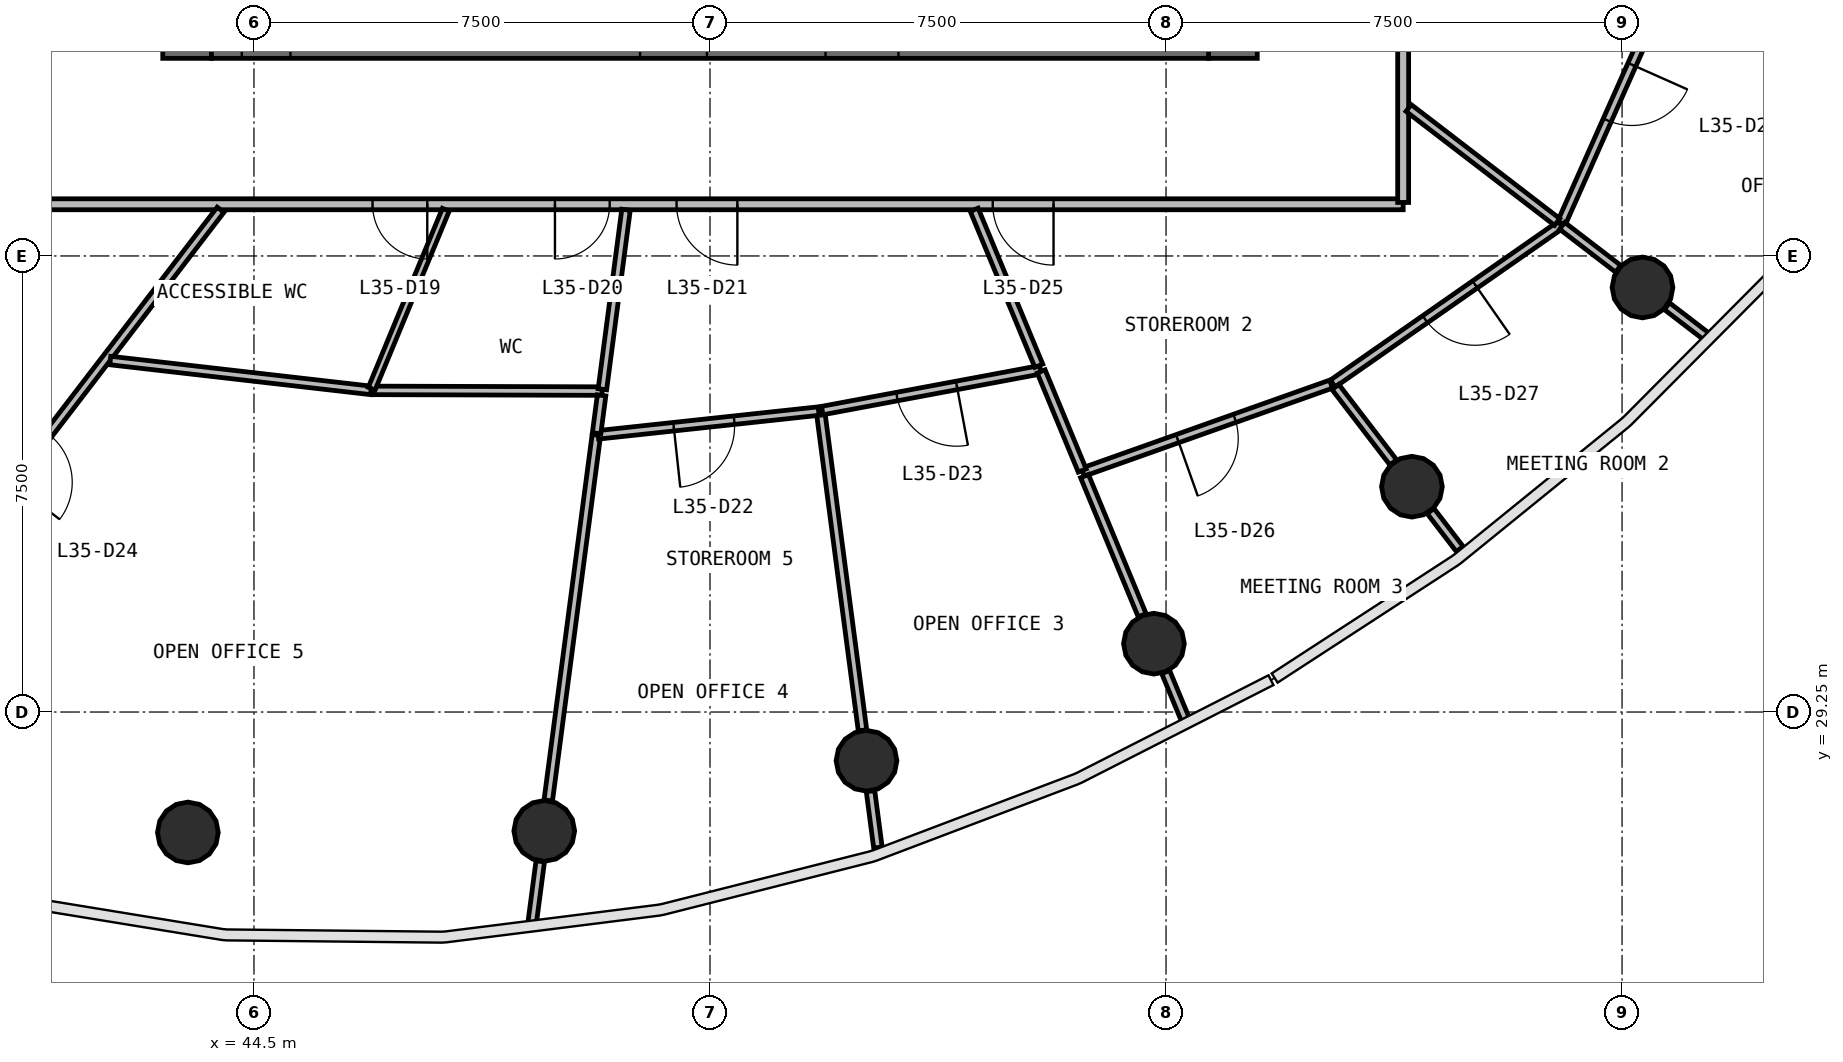
"""IFC4 building model, lengths in metres.
Left out: names, types, materials, properties, quantities, classifications, styles, units other than length and angle.
Written with IfcOpenShell. Run it as: python <this file> out.ifc"""

import sys

from ifc_helpers import new_model, si_unit, direction, frame, frame_2d, origin, origin_2d, place, context, subcontext, project, spatial, rectangle, circle, extrude, source, transform, mapped, element, fill, save


model = new_model("IFC4")
c1 = context("Model", 3, precision=1e-05, world=origin(), true_north=direction((0.0, 1.0)))
c2 = subcontext(c1, "Body", "Model", "MODEL_VIEW")
j1 = project(units=[si_unit("LENGTHUNIT", "METRE"), si_unit("PLANEANGLEUNIT", "RADIAN")], contexts=[c1])
p1 = place(None, origin())
s1 = spatial("IfcSite", under=j1, at=p1, CompositionType="ELEMENT")
p2 = place(p1, origin())
s2 = spatial("IfcBuilding", under=s1, at=p2, CompositionType="ELEMENT")
p3 = place(p2, frame((0.0, 0.0, 148.7)))
s3 = spatial("IfcBuildingStorey", under=s2, at=p3, CompositionType="ELEMENT", Elevation=148.7)
p4 = place(p3, frame((60.6, 40.0, 0.0), z_axis=(0.0, 0.0, 1.0), x_axis=(0.0, 1.0, 0.0)))
e1 = element("IfcWall", 1, at=p4, inside=s3, PredefinedType="SHEAR", context=c2, shape_type="SweptSolid", body=[
    extrude(rectangle(XDim=16.0, YDim=0.8, at=frame_2d((8.0, 0.0))), origin(), (0.0, 0.0, 1.0), 3.9),
])
p5 = place(p4, frame((7.1, 0.0, 0.0)))
e2 = element("IfcOpeningElement", 2, at=p5, cuts=e1, PredefinedType="OPENING", context=c2, shape_type="SweptSolid", body=[
    extrude(rectangle(XDim=1.8, YDim=2.1, at=frame_2d((0.9, 1.05))), frame((0.0, 0.41, 0.0), z_axis=(0.0, -1.0, 0.0), x_axis=(1.0, 0.0, 0.0)), (0.0, 0.0, 1.0), 0.82),
])
p6 = place(p3, frame((43.4, 56.0, 0.0), z_axis=(0.0, 0.0, 1.0), x_axis=(0.0, -1.0, 0.0)))
e3 = element("IfcWall", 3, at=p6, inside=s3, PredefinedType="SHEAR", context=c2, shape_type="SweptSolid", body=[
    extrude(rectangle(XDim=16.0, YDim=0.8, at=frame_2d((8.0, 0.0))), origin(), (0.0, 0.0, 1.0), 3.9),
])
p7 = place(p6, frame((7.1, 0.0, 0.0)))
e4 = element("IfcOpeningElement", 4, at=p7, cuts=e3, PredefinedType="OPENING", context=c2, shape_type="SweptSolid", body=[
    extrude(rectangle(XDim=1.8, YDim=2.1, at=frame_2d((0.9, 1.05))), frame((0.0, 0.41, 0.0), z_axis=(0.0, -1.0, 0.0), x_axis=(1.0, 0.0, 0.0)), (0.0, 0.0, 1.0), 0.82),
])
p8 = place(p3, frame((43.8, 40.4, 0.0), z_axis=(0.0, 0.0, 1.0), x_axis=(1.0, 0.0, 0.0)))
e5 = element("IfcWall", 5, at=p8, inside=s3, PredefinedType="SHEAR", context=c2, shape_type="SweptSolid", body=[
    extrude(rectangle(XDim=16.4, YDim=0.8, at=frame_2d((8.2, 0.0))), origin(), (0.0, 0.0, 1.0), 3.9),
])
p9 = place(p8, frame((10.1, 0.0, 0.0)))
e6 = element("IfcOpeningElement", 6, at=p9, cuts=e5, PredefinedType="OPENING", context=c2, shape_type="SweptSolid", body=[
    extrude(rectangle(XDim=1.2, YDim=2.1, at=frame_2d((0.6, 1.05))), frame((0.0, 0.41, 0.0), z_axis=(0.0, -1.0, 0.0), x_axis=(1.0, 0.0, 0.0)), (0.0, 0.0, 1.0), 0.82),
])
p10 = place(p8, frame((7.05, 0.0, 0.0)))
e7 = element("IfcOpeningElement", 7, at=p10, cuts=e5, PredefinedType="OPENING", context=c2, shape_type="SweptSolid", body=[
    extrude(rectangle(XDim=1.1, YDim=2.1, at=frame_2d((0.55, 1.05))), frame((0.0, 0.41, 0.0), z_axis=(0.0, -1.0, 0.0), x_axis=(1.0, 0.0, 0.0)), (0.0, 0.0, 1.0), 0.82),
])
p11 = place(p8, frame((0.5, 0.0, 0.0)))
e8 = element("IfcOpeningElement", 8, at=p11, cuts=e5, PredefinedType="OPENING", context=c2, shape_type="SweptSolid", body=[
    extrude(rectangle(XDim=0.8, YDim=2.1, at=frame_2d((0.4, 1.05))), frame((0.0, 0.41, 0.0), z_axis=(0.0, -1.0, 0.0), x_axis=(1.0, 0.0, 0.0)), (0.0, 0.0, 1.0), 0.82),
])
m1 = source(origin(), c2, "Body", "SweptSolid", [
    extrude(circle(Radius=0.5, at=origin_2d()), origin(), (0.0, 0.0, 1.0), 3.9),
])
for number, where, z_axis, x_axis in (
    (9, (43.413, 27.269, 0.0), (0.0, 0.0, 1.0), (1.0, 0.0, 0.0)),
    (10, (49.274, 27.295, 0.0), (0.0, 0.0, 1.0), (1.0, 0.0, 0.0)),
    (11, (54.574, 28.449, 0.0), (0.0, 0.0, 1.0), (1.0, 0.0, 0.0)),
    (12, (59.301, 30.374, 0.0), (0.0, 0.0, 1.0), (1.0, 0.0, 0.0)),
    (13, (63.544, 32.956, 0.0), (0.0, 0.0, 1.0), (1.0, 0.0, 0.0)),
    (14, (67.336, 36.232, 0.0), (0.0, 0.0, 1.0), (1.0, 0.0, 0.0)),
):
    element("IfcColumn", number, at=place(p3, frame(where, z_axis=z_axis, x_axis=x_axis)), inside=s3, PredefinedType="COLUMN", context=c2, shape_type="MappedRepresentation", body=[
        mapped(m1, transform((0.0, 0.0, 0.0), scale=1.0)),
    ])
p12 = place(p3, frame((63.4, 37.6, 0.0), z_axis=(0.0, 0.0, 1.0), x_axis=(-1.0, 0.0, 0.0)))
e15 = element("IfcWall", 15, at=p12, inside=s3, PredefinedType="PARTITIONING", context=c2, shape_type="SweptSolid", body=[
    extrude(rectangle(XDim=22.8, YDim=0.18, at=frame_2d((11.4, 0.0))), origin(), (0.0, 0.0, 1.0), 2.88),
])
p13 = place(p12, frame((16.05, 0.0, 0.0)))
e16 = element("IfcOpeningElement", 16, at=p13, cuts=e15, PredefinedType="OPENING", context=c2, shape_type="SweptSolid", body=[
    extrude(rectangle(XDim=0.9, YDim=2.1, at=frame_2d((0.45, 1.05))), frame((0.0, 0.1, 0.0), z_axis=(0.0, -1.0, 0.0), x_axis=(1.0, 0.0, 0.0)), (0.0, 0.0, 1.0), 0.2),
])
p14 = place(p12, frame((13.05, 0.0, 0.0)))
e17 = element("IfcOpeningElement", 17, at=p14, cuts=e15, PredefinedType="OPENING", context=c2, shape_type="SweptSolid", body=[
    extrude(rectangle(XDim=0.9, YDim=2.1, at=frame_2d((0.45, 1.05))), frame((0.0, 0.1, 0.0), z_axis=(0.0, -1.0, 0.0), x_axis=(1.0, 0.0, 0.0)), (0.0, 0.0, 1.0), 0.2),
])
p15 = place(p12, frame((10.95, 0.0, 0.0)))
e18 = element("IfcOpeningElement", 18, at=p15, cuts=e15, PredefinedType="OPENING", context=c2, shape_type="SweptSolid", body=[
    extrude(rectangle(XDim=1.0, YDim=2.1, at=frame_2d((0.5, 1.05))), frame((0.0, 0.1, 0.0), z_axis=(0.0, -1.0, 0.0), x_axis=(1.0, 0.0, 0.0)), (0.0, 0.0, 1.0), 0.2),
])
p16 = place(p12, frame((5.75, 0.0, 0.0)))
e19 = element("IfcOpeningElement", 19, at=p16, cuts=e15, PredefinedType="OPENING", context=c2, shape_type="SweptSolid", body=[
    extrude(rectangle(XDim=1.0, YDim=2.1, at=frame_2d((0.5, 1.05))), frame((0.0, 0.1, 0.0), z_axis=(0.0, -1.0, 0.0), x_axis=(1.0, 0.0, 0.0)), (0.0, 0.0, 1.0), 0.2),
])
p17 = place(p3, frame((63.4, 58.37, 0.0), z_axis=(0.0, 0.0, 1.0), x_axis=(0.0, -1.0, 0.0)))
e20 = element("IfcWall", 20, at=p17, inside=s3, PredefinedType="PARTITIONING", context=c2, shape_type="SweptSolid", body=[
    extrude(rectangle(XDim=20.74, YDim=0.18, at=frame_2d((10.37, 0.0))), origin(), (0.0, 0.0, 1.0), 2.88),
])
p18 = place(p17, frame((9.89, 0.0, 0.0)))
e21 = element("IfcOpeningElement", 21, at=p18, cuts=e20, PredefinedType="OPENING", context=c2, shape_type="SweptSolid", body=[
    extrude(rectangle(XDim=1.0, YDim=2.1, at=frame_2d((0.5, 1.05))), frame((0.0, 0.1, 0.0), z_axis=(0.0, -1.0, 0.0), x_axis=(1.0, 0.0, 0.0)), (0.0, 0.0, 1.0), 0.2),
])
p19 = place(p17, frame((7.69, 0.0, 0.0)))
e22 = element("IfcOpeningElement", 22, at=p19, cuts=e20, PredefinedType="OPENING", context=c2, shape_type="SweptSolid", body=[
    extrude(rectangle(XDim=1.0, YDim=2.1, at=frame_2d((0.5, 1.05))), frame((0.0, 0.1, 0.0), z_axis=(0.0, -1.0, 0.0), x_axis=(1.0, 0.0, 0.0)), (0.0, 0.0, 1.0), 0.2),
])
p20 = place(p17, frame((4.29, 0.0, 0.0)))
e23 = element("IfcOpeningElement", 23, at=p20, cuts=e20, PredefinedType="OPENING", context=c2, shape_type="SweptSolid", body=[
    extrude(rectangle(XDim=1.0, YDim=2.1, at=frame_2d((0.5, 1.05))), frame((0.0, 0.1, 0.0), z_axis=(0.0, -1.0, 0.0), x_axis=(1.0, 0.0, 0.0)), (0.0, 0.0, 1.0), 0.2),
])
p21 = place(p3, frame((43.951, 37.51, 0.0), z_axis=(0.0, 0.0, 1.0), x_axis=(-0.608768467527, -0.793347939396, 0.0)))
e24 = element("IfcWall", 24, at=p21, inside=s3, PredefinedType="PARTITIONING", context=c2, shape_type="SweptSolid", body=[
    extrude(rectangle(XDim=10.297, YDim=0.14, at=frame_2d((5.148, 0.0))), origin(), (0.0, 0.0, 1.0), 2.88),
])
p22 = place(p21, frame((4.65, 0.0, 0.0)))
e25 = element("IfcOpeningElement", 25, at=p22, cuts=e24, PredefinedType="OPENING", context=c2, shape_type="SweptSolid", body=[
    extrude(rectangle(XDim=1.0, YDim=2.1, at=frame_2d((0.5, 1.05))), frame((0.0, 0.08, 0.0), z_axis=(0.0, -1.0, 0.0), x_axis=(1.0, 0.0, 0.0)), (0.0, 0.0, 1.0), 0.16),
])
p23 = place(p3, frame((50.131, 33.805, 0.0), z_axis=(0.0, 0.0, 1.0), x_axis=(-0.130525353545, -0.991444971787, 0.0)))
e26 = element("IfcWall", 26, at=p23, inside=s3, PredefinedType="PARTITIONING", context=c2, shape_type="SweptSolid", body=[
    extrude(rectangle(XDim=6.062, YDim=0.14, at=frame_2d((3.031, 0.0))), origin(), (0.0, 0.0, 1.0), 2.88),
])
p24 = place(p3, frame((53.816, 34.202, 0.0), z_axis=(0.0, 0.0, 1.0), x_axis=(0.130530791744, -0.991444255824, 0.0)))
e27 = element("IfcWall", 27, at=p24, inside=s3, PredefinedType="PARTITIONING", context=c2, shape_type="SweptSolid", body=[
    extrude(rectangle(XDim=5.299, YDim=0.14, at=frame_2d((2.649, 0.0))), origin(), (0.0, 0.0, 1.0), 2.88),
])
p25 = place(p3, frame((65.991, 37.264, 0.0), z_axis=(0.0, 0.0, 1.0), x_axis=(-0.820422470547, -0.571757789471, 0.0)))
e28 = element("IfcWall", 28, at=p25, inside=s3, PredefinedType="PARTITIONING", context=c2, shape_type="SweptSolid", body=[
    extrude(rectangle(XDim=4.569, YDim=0.14, at=frame_2d((2.285, 0.0))), origin(), (0.0, 0.0, 1.0), 2.88),
])
p26 = place(p25, frame((1.719, 0.0, 0.0)))
e29 = element("IfcOpeningElement", 29, at=p26, cuts=e28, PredefinedType="OPENING", context=c2, shape_type="SweptSolid", body=[
    extrude(rectangle(XDim=1.0, YDim=2.1, at=frame_2d((0.5, 1.05))), frame((0.0, 0.08, 0.0), z_axis=(0.0, -1.0, 0.0), x_axis=(1.0, 0.0, 0.0)), (0.0, 0.0, 1.0), 0.16),
])
p27 = place(p3, frame((67.847, 41.436, 0.0), z_axis=(0.0, 0.0, 1.0), x_axis=(-0.406478027922, -0.913660556671, 0.0)))
e30 = element("IfcWall", 30, at=p27, inside=s3, PredefinedType="PARTITIONING", context=c2, shape_type="SweptSolid", body=[
    extrude(rectangle(XDim=4.536, YDim=0.14, at=frame_2d((2.268, 0.0))), origin(), (0.0, 0.0, 1.0), 2.88),
])
p28 = place(p27, frame((1.686, 0.0, 0.0)))
e31 = element("IfcOpeningElement", 31, at=p28, cuts=e30, PredefinedType="OPENING", context=c2, shape_type="SweptSolid", body=[
    extrude(rectangle(XDim=1.0, YDim=2.1, at=frame_2d((0.5, 1.05))), frame((0.0, 0.08, 0.0), z_axis=(0.0, -1.0, 0.0), x_axis=(1.0, 0.0, 0.0)), (0.0, 0.0, 1.0), 0.16),
])
p29 = place(p3, frame((42.136, 35.031, 0.0), z_axis=(0.0, 0.0, 1.0), x_axis=(0.993502737761, -0.113808216145, 0.0)))
e32 = element("IfcWall", 32, at=p29, inside=s3, PredefinedType="PARTITIONING", context=c2, shape_type="SweptSolid", body=[
    extrude(rectangle(XDim=4.316, YDim=0.14, at=frame_2d((2.158, 0.0))), origin(), (0.0, 0.0, 1.0), 2.88),
])
p30 = place(p3, frame((62.214, 34.642, 0.0), z_axis=(0.0, 0.0, 1.0), x_axis=(-0.942495933597, -0.33421761646, 0.0)))
e33 = element("IfcWall", 33, at=p30, inside=s3, PredefinedType="PARTITIONING", context=c2, shape_type="SweptSolid", body=[
    extrude(rectangle(XDim=4.33, YDim=0.14, at=frame_2d((2.165, 0.0))), origin(), (0.0, 0.0, 1.0), 2.88),
])
p31 = place(p30, frame((1.681, 0.0, 0.0)))
e34 = element("IfcOpeningElement", 34, at=p31, cuts=e33, PredefinedType="OPENING", context=c2, shape_type="SweptSolid", body=[
    extrude(rectangle(XDim=1.0, YDim=2.1, at=frame_2d((0.5, 1.05))), frame((0.0, 0.08, 0.0), z_axis=(0.0, -1.0, 0.0), x_axis=(1.0, 0.0, 0.0)), (0.0, 0.0, 1.0), 0.16),
])
p32 = place(p3, frame((46.454, 34.539, 0.0), z_axis=(0.0, 0.0, 1.0), x_axis=(0.999995567734, -0.002977333082, 0.0)))
e35 = element("IfcWall", 35, at=p32, inside=s3, PredefinedType="PARTITIONING", context=c2, shape_type="SweptSolid", body=[
    extrude(rectangle(XDim=3.772, YDim=0.14, at=frame_2d((1.886, 0.0))), origin(), (0.0, 0.0, 1.0), 2.88),
])
p33 = place(p3, frame((53.787, 34.199, 0.0), z_axis=(0.0, 0.0, 1.0), x_axis=(-0.994246424416, -0.107116980612, 0.0)))
e36 = element("IfcWall", 36, at=p33, inside=s3, PredefinedType="PARTITIONING", context=c2, shape_type="SweptSolid", body=[
    extrude(rectangle(XDim=3.647, YDim=0.14, at=frame_2d((1.823, 0.0))), origin(), (0.0, 0.0, 1.0), 2.88),
])
p34 = place(p33, frame((1.397, 0.0, 0.0)))
e37 = element("IfcOpeningElement", 37, at=p34, cuts=e36, PredefinedType="OPENING", context=c2, shape_type="SweptSolid", body=[
    extrude(rectangle(XDim=1.0, YDim=2.1, at=frame_2d((0.5, 1.05))), frame((0.0, 0.08, 0.0), z_axis=(0.0, -1.0, 0.0), x_axis=(1.0, 0.0, 0.0)), (0.0, 0.0, 1.0), 0.16),
])
p35 = place(p3, frame((57.435, 34.879, 0.0), z_axis=(0.0, 0.0, 1.0), x_axis=(-0.982959886945, -0.183820185661, 0.0)))
e38 = element("IfcWall", 38, at=p35, inside=s3, PredefinedType="PARTITIONING", context=c2, shape_type="SweptSolid", body=[
    extrude(rectangle(XDim=3.651, YDim=0.14, at=frame_2d((1.826, 0.0))), origin(), (0.0, 0.0, 1.0), 2.88),
])
p36 = place(p35, frame((1.401, 0.0, 0.0)))
e39 = element("IfcOpeningElement", 39, at=p36, cuts=e38, PredefinedType="OPENING", context=c2, shape_type="SweptSolid", body=[
    extrude(rectangle(XDim=1.0, YDim=2.1, at=frame_2d((0.5, 1.05))), frame((0.0, 0.08, 0.0), z_axis=(0.0, -1.0, 0.0), x_axis=(1.0, 0.0, 0.0)), (0.0, 0.0, 1.0), 0.16),
])
p37 = place(p3, frame((63.49, 39.183, 0.0), z_axis=(0.0, 0.0, 1.0), x_axis=(0.793377890256, -0.608729433535, 0.0)))
e40 = element("IfcWall", 40, at=p37, inside=s3, PredefinedType="PARTITIONING", context=c2, shape_type="SweptSolid", body=[
    extrude(rectangle(XDim=3.079, YDim=0.14, at=frame_2d((1.54, 0.0))), origin(), (0.0, 0.0, 1.0), 2.88),
])
p38 = place(p3, frame((50.619, 37.51, 0.0), z_axis=(0.0, 0.0, 1.0), x_axis=(-0.130520256622, -0.991445642792, 0.0)))
e41 = element("IfcWall", 41, at=p38, inside=s3, PredefinedType="PARTITIONING", context=c2, shape_type="SweptSolid", body=[
    extrude(rectangle(XDim=2.978, YDim=0.14, at=frame_2d((1.489, 0.0))), origin(), (0.0, 0.0, 1.0), 2.88),
])
p39 = place(p3, frame((56.345, 37.51, 0.0), z_axis=(0.0, 0.0, 1.0), x_axis=(0.382703871955, -0.923871065891, 0.0)))
e42 = element("IfcWall", 42, at=p39, inside=s3, PredefinedType="PARTITIONING", context=c2, shape_type="SweptSolid", body=[
    extrude(rectangle(XDim=2.776, YDim=0.14, at=frame_2d((1.388, 0.0))), origin(), (0.0, 0.0, 1.0), 2.88),
])
p40 = place(p3, frame((58.159, 33.13, 0.0), z_axis=(0.0, 0.0, 1.0), x_axis=(0.382746335528, -0.923853474659, 0.0)))
e43 = element("IfcWall", 43, at=p40, inside=s3, PredefinedType="PARTITIONING", context=c2, shape_type="SweptSolid", body=[
    extrude(rectangle(XDim=2.478, YDim=0.14, at=frame_2d((1.239, 0.0))), origin(), (0.0, 0.0, 1.0), 2.88),
])
p41 = place(p3, frame((57.446, 34.851, 0.0), z_axis=(0.0, 0.0, 1.0), x_axis=(0.382677866108, -0.923881838111, 0.0)))
e44 = element("IfcWall", 44, at=p41, inside=s3, PredefinedType="PARTITIONING", context=c2, shape_type="SweptSolid", body=[
    extrude(rectangle(XDim=1.763, YDim=0.14, at=frame_2d((0.882, 0.0))), origin(), (0.0, 0.0, 1.0), 2.88),
])
p42 = place(p3, frame((62.285, 34.596, 0.0), z_axis=(0.0, 0.0, 1.0), x_axis=(0.608683936364, -0.793412796476, 0.0)))
e45 = element("IfcWall", 45, at=p42, inside=s3, PredefinedType="PARTITIONING", context=c2, shape_type="SweptSolid", body=[
    extrude(rectangle(XDim=1.563, YDim=0.14, at=frame_2d((0.782, 0.0))), origin(), (0.0, 0.0, 1.0), 2.88),
])
p43 = place(p3, frame((66.015, 37.246, 0.0), z_axis=(0.0, 0.0, 1.0), x_axis=(0.793288065576, -0.608846487233, 0.0)))
e46 = element("IfcWall", 46, at=p43, inside=s3, PredefinedType="PARTITIONING", context=c2, shape_type="SweptSolid", body=[
    extrude(rectangle(XDim=1.161, YDim=0.14, at=frame_2d((0.581, 0.0))), origin(), (0.0, 0.0, 1.0), 2.88),
])
p44 = place(p3, frame((49.208, 26.795, 0.0), z_axis=(0.0, 0.0, 1.0), x_axis=(-0.130609492545, -0.991433891118, 0.0)))
e47 = element("IfcWall", 47, at=p44, inside=s3, PredefinedType="PARTITIONING", context=c2, shape_type="SweptSolid", body=[
    extrude(rectangle(XDim=1.019, YDim=0.14, at=frame_2d((0.509, 0.0))), origin(), (0.0, 0.0, 1.0), 2.88),
])
p45 = place(p3, frame((54.64, 27.948, 0.0), z_axis=(0.0, 0.0, 1.0), x_axis=(0.130488267119, -0.99144985357, 0.0)))
e48 = element("IfcWall", 48, at=p45, inside=s3, PredefinedType="PARTITIONING", context=c2, shape_type="SweptSolid", body=[
    extrude(rectangle(XDim=0.936, YDim=0.14, at=frame_2d((0.468, 0.0))), origin(), (0.0, 0.0, 1.0), 2.88),
])
p46 = place(p3, frame((59.494, 29.908, 0.0), z_axis=(0.0, 0.0, 1.0), x_axis=(0.382581654882, -0.923921683558, 0.0)))
e49 = element("IfcWall", 49, at=p46, inside=s3, PredefinedType="PARTITIONING", context=c2, shape_type="SweptSolid", body=[
    extrude(rectangle(XDim=0.844, YDim=0.14, at=frame_2d((0.422, 0.0))), origin(), (0.0, 0.0, 1.0), 2.88),
])
p47 = place(p3, frame((67.737, 35.925, 0.0), z_axis=(0.0, 0.0, 1.0), x_axis=(0.79344724315, -0.608639032873, 0.0)))
e50 = element("IfcWall", 50, at=p47, inside=s3, PredefinedType="PARTITIONING", context=c2, shape_type="SweptSolid", body=[
    extrude(rectangle(XDim=0.815, YDim=0.14, at=frame_2d((0.408, 0.0))), origin(), (0.0, 0.0, 1.0), 2.88),
])
p48 = place(p3, frame((63.851, 32.555, 0.0), z_axis=(0.0, 0.0, 1.0), x_axis=(0.608886809997, -0.793257116332, 0.0)))
e51 = element("IfcWall", 51, at=p48, inside=s3, PredefinedType="PARTITIONING", context=c2, shape_type="SweptSolid", body=[
    extrude(rectangle(XDim=0.788, YDim=0.14, at=frame_2d((0.394, 0.0))), origin(), (0.0, 0.0, 1.0), 2.88),
])
p49 = place(p3, frame((50.217, 34.458, 0.0), z_axis=(0.0, 0.0, 1.0), x_axis=(-0.130916756961, -0.991393364284, 0.0)))
e52 = element("IfcWall", 52, at=p49, inside=s3, PredefinedType="PARTITIONING", context=c2, shape_type="SweptSolid", body=[
    extrude(rectangle(XDim=0.628, YDim=0.14, at=frame_2d((0.314, 0.0))), origin(), (0.0, 0.0, 1.0), 2.88),
])
p50 = place(p3, frame((47.655, 37.51, 0.0), z_axis=(0.0, 0.0, 1.0), x_axis=(-0.382660896845, -0.923888866707, 0.0)))
e53 = element("IfcWall", 53, at=p50, inside=s3, PredefinedType="PARTITIONING", context=c2, shape_type="SweptSolid", body=[
    extrude(rectangle(XDim=3.186, YDim=0.12, at=frame_2d((1.593, 0.0))), origin(), (0.0, 0.0, 1.0), 2.88),
])
m2 = source(origin(), c2, "Body", "SweptSolid", [
    extrude(rectangle(XDim=0.9, YDim=2.1, at=frame_2d((0.45, 1.05))), frame((0.0, 0.025, 0.0), z_axis=(0.0, -1.0, 0.0), x_axis=(1.0, 0.0, 0.0)), (0.0, 0.0, 1.0), 0.05),
])
p51 = place(p13, origin())
e54 = element("IfcDoor", 54, at=p51, inside=s3, OperationType="SINGLE_SWING_LEFT", PredefinedType="DOOR", context=c2, shape_type="MappedRepresentation", body=[
    mapped(m2, transform((0.0, 0.0, 0.0), scale=1.0)),
])
fill(e16, e54)
p52 = place(p14, origin())
e55 = element("IfcDoor", 55, at=p52, inside=s3, OperationType="SINGLE_SWING_RIGHT", PredefinedType="DOOR", context=c2, shape_type="MappedRepresentation", body=[
    mapped(m2, transform((0.0, 0.0, 0.0), scale=1.0)),
])
fill(e17, e55)
m3 = source(origin(), c2, "Body", "SweptSolid", [
    extrude(rectangle(XDim=1.0, YDim=2.1, at=frame_2d((0.5, 1.05))), frame((0.0, 0.025, 0.0), z_axis=(0.0, -1.0, 0.0), x_axis=(1.0, 0.0, 0.0)), (0.0, 0.0, 1.0), 0.05),
])
p53 = place(p15, origin())
e56 = element("IfcDoor", 56, at=p53, inside=s3, OperationType="SINGLE_SWING_LEFT", PredefinedType="DOOR", context=c2, shape_type="MappedRepresentation", body=[
    mapped(m3, transform((0.0, 0.0, 0.0), scale=1.0)),
])
fill(e18, e56)
p54 = place(p34, origin())
e57 = element("IfcDoor", 57, at=p54, inside=s3, OperationType="SINGLE_SWING_RIGHT", PredefinedType="DOOR", context=c2, shape_type="MappedRepresentation", body=[
    mapped(m3, transform((0.0, 0.0, 0.0), scale=1.0)),
])
fill(e37, e57)
p55 = place(p36, origin())
e58 = element("IfcDoor", 58, at=p55, inside=s3, OperationType="SINGLE_SWING_LEFT", PredefinedType="DOOR", context=c2, shape_type="MappedRepresentation", body=[
    mapped(m3, transform((0.0, 0.0, 0.0), scale=1.0)),
])
fill(e39, e58)
p56 = place(p16, origin())
e59 = element("IfcDoor", 59, at=p56, inside=s3, OperationType="SINGLE_SWING_LEFT", PredefinedType="DOOR", context=c2, shape_type="MappedRepresentation", body=[
    mapped(m3, transform((0.0, 0.0, 0.0), scale=1.0)),
])
fill(e19, e59)
p57 = place(p31, origin())
e60 = element("IfcDoor", 60, at=p57, inside=s3, OperationType="SINGLE_SWING_RIGHT", PredefinedType="DOOR", context=c2, shape_type="MappedRepresentation", body=[
    mapped(m3, transform((0.0, 0.0, 0.0), scale=1.0)),
])
fill(e34, e60)
p58 = place(p26, origin())
e61 = element("IfcDoor", 61, at=p58, inside=s3, OperationType="SINGLE_SWING_LEFT", PredefinedType="DOOR", context=c2, shape_type="MappedRepresentation", body=[
    mapped(m3, transform((0.0, 0.0, 0.0), scale=1.0)),
])
fill(e29, e61)
p59 = place(p28, origin())
e62 = element("IfcDoor", 62, at=p59, inside=s3, OperationType="SINGLE_SWING_LEFT", PredefinedType="DOOR", context=c2, shape_type="MappedRepresentation", body=[
    mapped(m3, transform((0.0, 0.0, 0.0), scale=1.0)),
])
fill(e31, e62)
save(model, sys.argv[1])
